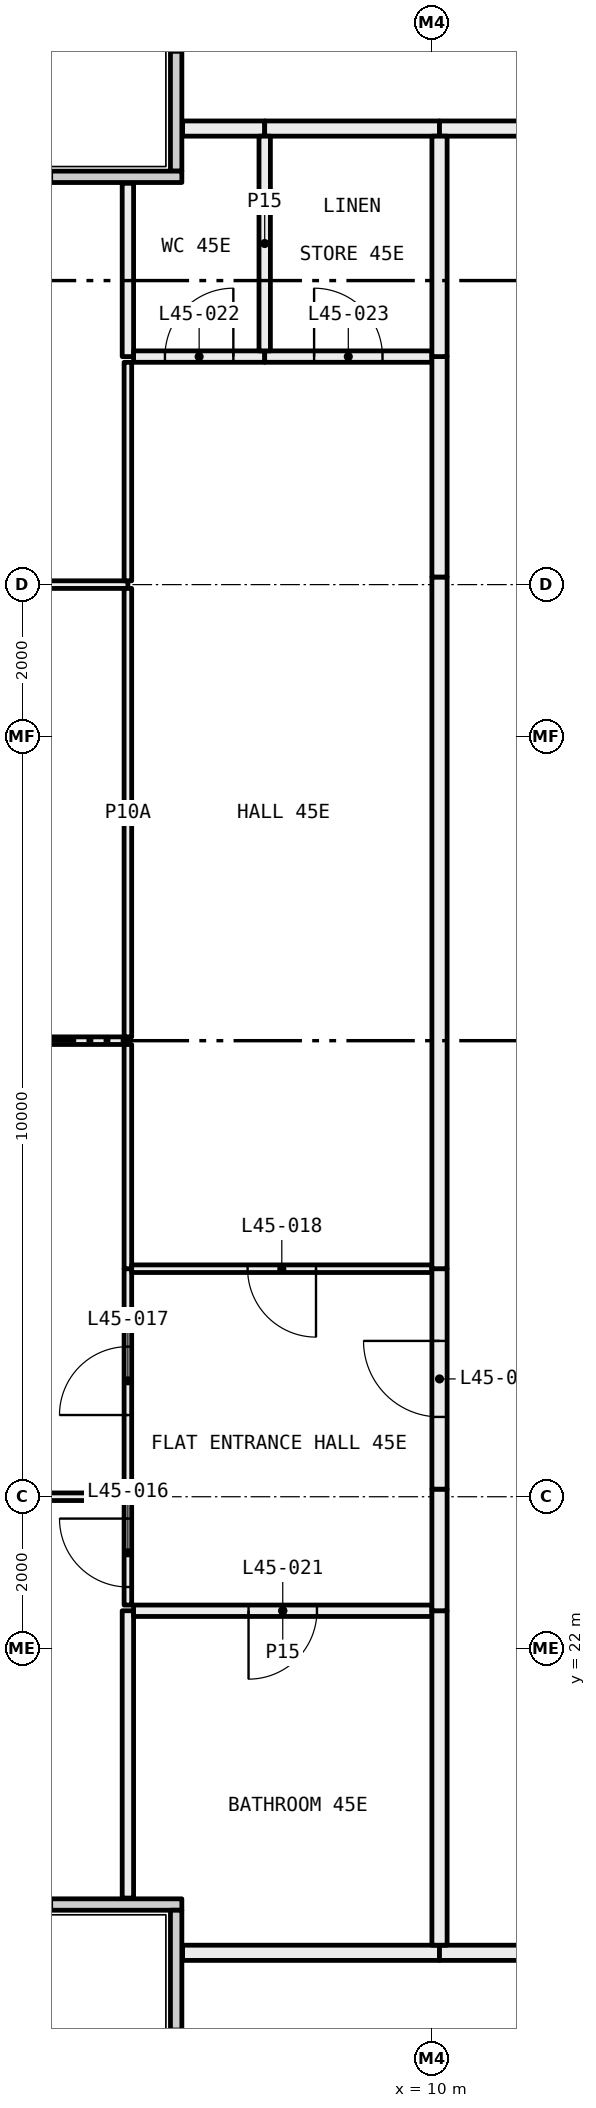
"""IFC4 building model, lengths in metres.
Left out: names, types, materials, properties, quantities, classifications, styles, units other than length and angle.
Written with IfcOpenShell. Run it as: python <this file> out.ifc"""

import sys

from ifc_helpers import new_model, si_unit, direction, frame, frame_2d, origin, place, context, subcontext, project, spatial, rectangle, extrude, element, fill, save


model = new_model("IFC4")
c1 = context("Model", 3, precision=1e-05, world=origin(), true_north=direction((0.0, 1.0)))
c2 = subcontext(c1, "Body", "Model", "MODEL_VIEW")
j1 = project(units=[si_unit("LENGTHUNIT", "METRE"), si_unit("PLANEANGLEUNIT", "RADIAN")], contexts=[c1])
p1 = place(None, origin())
s1 = spatial("IfcSite", under=j1, at=p1, CompositionType="ELEMENT")
p2 = place(p1, origin())
s2 = spatial("IfcBuilding", under=s1, at=p2, CompositionType="ELEMENT")
p3 = place(p2, frame((0.0, 0.0, 172.05)))
s3 = spatial("IfcBuildingStorey", under=s2, at=p3, CompositionType="ELEMENT", Elevation=172.05)
p4 = place(p3, frame((6.635, 41.44, 0.0), z_axis=(0.0, 0.0, 1.0), x_axis=(0.0, 1.0, 0.0)))
e1 = element("IfcWall", 1, at=p4, inside=s3, PredefinedType="ELEMENTEDWALL", context=c2, shape_type="SweptSolid", body=[
    extrude(rectangle(XDim=5.85, YDim=0.15, at=frame_2d((2.925, 0.0))), origin(), (0.0, 0.0, 1.0), 3.05),
])
p5 = place(p4, frame((1.56, 0.0, 0.45)))
e2 = element("IfcOpeningElement", 2, at=p5, cuts=e1, PredefinedType="OPENING", context=c2, shape_type="SweptSolid", body=[
    extrude(rectangle(XDim=4.0, YDim=2.55, at=frame_2d((2.0, 1.275))), frame((0.0, 0.085, 0.0), z_axis=(0.0, -1.0, 0.0), x_axis=(1.0, 0.0, 0.0)), (0.0, 0.0, 1.0), 0.17),
])
p6 = place(p3, frame((0.56, 41.365, 0.0), z_axis=(0.0, 0.0, 1.0), x_axis=(1.0, 0.0, 0.0)))
e3 = element("IfcWall", 3, at=p6, inside=s3, PredefinedType="ELEMENTEDWALL", context=c2, shape_type="SweptSolid", body=[
    extrude(rectangle(XDim=6.15, YDim=0.15, at=frame_2d((3.075, 0.0))), origin(), (0.0, 0.0, 1.0), 3.05),
])
p7 = place(p6, frame((0.44, 0.0, 0.45)))
e4 = element("IfcOpeningElement", 4, at=p7, cuts=e3, PredefinedType="OPENING", context=c2, shape_type="SweptSolid", body=[
    extrude(rectangle(XDim=4.0, YDim=2.55, at=frame_2d((2.0, 1.275))), frame((0.0, 0.085, 0.0), z_axis=(0.0, -1.0, 0.0), x_axis=(1.0, 0.0, 0.0)), (0.0, 0.0, 1.0), 0.17),
])
p8 = place(p3, frame((0.56, 18.635, 0.0), z_axis=(0.0, 0.0, 1.0), x_axis=(1.0, 0.0, 0.0)))
e5 = element("IfcWall", 5, at=p8, inside=s3, PredefinedType="ELEMENTEDWALL", context=c2, shape_type="SweptSolid", body=[
    extrude(rectangle(XDim=6.15, YDim=0.15, at=frame_2d((3.075, 0.0))), origin(), (0.0, 0.0, 1.0), 3.05),
])
p9 = place(p8, frame((0.44, 0.0, 0.45)))
e6 = element("IfcOpeningElement", 6, at=p9, cuts=e5, PredefinedType="OPENING", context=c2, shape_type="SweptSolid", body=[
    extrude(rectangle(XDim=4.0, YDim=2.55, at=frame_2d((2.0, 1.275))), frame((0.0, 0.085, 0.0), z_axis=(0.0, -1.0, 0.0), x_axis=(1.0, 0.0, 0.0)), (0.0, 0.0, 1.0), 0.17),
])
p10 = place(p3, frame((6.635, 12.71, 0.0), z_axis=(0.0, 0.0, 1.0), x_axis=(0.0, 1.0, 0.0)))
e7 = element("IfcWall", 7, at=p10, inside=s3, PredefinedType="ELEMENTEDWALL", context=c2, shape_type="SweptSolid", body=[
    extrude(rectangle(XDim=5.85, YDim=0.15, at=frame_2d((2.925, 0.0))), origin(), (0.0, 0.0, 1.0), 3.05),
])
p11 = place(p10, frame((0.29, 0.0, 0.45)))
e8 = element("IfcOpeningElement", 8, at=p11, cuts=e7, PredefinedType="OPENING", context=c2, shape_type="SweptSolid", body=[
    extrude(rectangle(XDim=4.0, YDim=2.55, at=frame_2d((2.0, 1.275))), frame((0.0, 0.085, 0.0), z_axis=(0.0, -1.0, 0.0), x_axis=(1.0, 0.0, 0.0)), (0.0, 0.0, 1.0), 0.17),
])
p12 = place(p3, frame((10.1, 18.0, 0.0), z_axis=(0.0, 0.0, 1.0), x_axis=(-1.0, 0.0, 0.0)))
e9 = element("IfcWall", 9, at=p12, inside=s3, PredefinedType="PARTITIONING", context=c2, shape_type="SweptSolid", body=[
    extrude(rectangle(XDim=3.38, YDim=0.2, at=frame_2d((1.69, 0.0))), origin(), (0.0, 0.0, 1.0), 3.05),
])
p13 = place(p3, frame((12.0, 18.0, 0.0), z_axis=(0.0, 0.0, 1.0), x_axis=(-1.0, 0.0, 0.0)))
e10 = element("IfcWall", 10, at=p13, inside=s3, PredefinedType="PARTITIONING", context=c2, shape_type="SweptSolid", body=[
    extrude(rectangle(XDim=1.9, YDim=0.2, at=frame_2d((0.95, 0.0))), origin(), (0.0, 0.0, 1.0), 3.05),
])
p14 = place(p3, frame((6.72, 42.0, 0.0), z_axis=(0.0, 0.0, 1.0), x_axis=(1.0, 0.0, 0.0)))
e11 = element("IfcWall", 11, at=p14, inside=s3, PredefinedType="PARTITIONING", context=c2, shape_type="SweptSolid", body=[
    extrude(rectangle(XDim=1.08, YDim=0.2, at=frame_2d((0.54, 0.0))), origin(), (0.0, 0.0, 1.0), 3.05),
])
p15 = place(p3, frame((7.8, 42.0, 0.0), z_axis=(0.0, 0.0, 1.0), x_axis=(1.0, 0.0, 0.0)))
e12 = element("IfcWall", 12, at=p15, inside=s3, PredefinedType="PARTITIONING", context=c2, shape_type="SweptSolid", body=[
    extrude(rectangle(XDim=2.3, YDim=0.2, at=frame_2d((1.15, 0.0))), origin(), (0.0, 0.0, 1.0), 3.05),
])
p16 = place(p3, frame((10.1, 42.0, 0.0), z_axis=(0.0, 0.0, 1.0), x_axis=(1.0, 0.0, 0.0)))
e13 = element("IfcWall", 13, at=p16, inside=s3, PredefinedType="PARTITIONING", context=c2, shape_type="SweptSolid", body=[
    extrude(rectangle(XDim=1.9, YDim=0.2, at=frame_2d((0.95, 0.0))), origin(), (0.0, 0.0, 1.0), 3.05),
])
p17 = place(p3, frame((6.0, 24.0, 0.0), z_axis=(0.0, 0.0, 1.0), x_axis=(-1.0, 0.0, 0.0)))
e14 = element("IfcWall", 14, at=p17, inside=s3, PredefinedType="PARTITIONING", context=c2, shape_type="SweptSolid", body=[
    extrude(rectangle(XDim=5.28, YDim=0.1, at=frame_2d((2.64, 0.0))), origin(), (0.0, 0.0, 1.0), 2.45),
])
p18 = place(p3, frame((6.0, 18.72, 0.0), z_axis=(0.0, 0.0, 1.0), x_axis=(0.0, 1.0, 0.0)))
e15 = element("IfcWall", 15, at=p18, inside=s3, PredefinedType="PARTITIONING", context=c2, shape_type="SweptSolid", body=[
    extrude(rectangle(XDim=3.78, YDim=0.15, at=frame_2d((1.89, 0.0))), origin(), (0.0, 0.0, 1.0), 3.05),
])
p19 = place(p3, frame((6.0, 22.575, 0.0), z_axis=(0.0, 0.0, 1.0), x_axis=(0.0, 1.0, 0.0)))
e16 = element("IfcWall", 16, at=p19, inside=s3, PredefinedType="PARTITIONING", context=c2, shape_type="SweptSolid", body=[
    extrude(rectangle(XDim=1.375, YDim=0.1, at=frame_2d((0.688, 0.0))), origin(), (0.0, 0.0, 1.0), 2.45),
])
p20 = place(p19, frame((0.238, 0.0, 0.0)))
e17 = element("IfcOpeningElement", 17, at=p20, cuts=e16, PredefinedType="OPENING", context=c2, shape_type="SweptSolid", body=[
    extrude(rectangle(XDim=0.9, YDim=2.1, at=frame_2d((0.45, 1.05))), frame((0.0, 0.06, 0.0), z_axis=(0.0, -1.0, 0.0), x_axis=(1.0, 0.0, 0.0)), (0.0, 0.0, 1.0), 0.12),
])
p21 = place(p3, frame((6.0, 30.0, 0.0), z_axis=(0.0, 0.0, 1.0), x_axis=(-1.0, 0.0, 0.0)))
e18 = element("IfcWall", 18, at=p21, inside=s3, PredefinedType="PARTITIONING", context=c2, shape_type="SweptSolid", body=[
    extrude(rectangle(XDim=5.28, YDim=0.1, at=frame_2d((2.64, 0.0))), origin(), (0.0, 0.0, 1.0), 3.05),
])
p22 = place(p21, frame((2.19, 0.0, 0.0)))
e19 = element("IfcOpeningElement", 19, at=p22, cuts=e18, PredefinedType="OPENING", context=c2, shape_type="SweptSolid", body=[
    extrude(rectangle(XDim=0.9, YDim=2.1, at=frame_2d((0.45, 1.05))), frame((0.0, 0.06, 0.0), z_axis=(0.0, -1.0, 0.0), x_axis=(1.0, 0.0, 0.0)), (0.0, 0.0, 1.0), 0.12),
])
p23 = place(p3, frame((6.0, 24.05, 0.0), z_axis=(0.0, 0.0, 1.0), x_axis=(0.0, 1.0, 0.0)))
e20 = element("IfcWall", 20, at=p23, inside=s3, PredefinedType="PARTITIONING", context=c2, shape_type="SweptSolid", body=[
    extrude(rectangle(XDim=2.95, YDim=0.1, at=frame_2d((1.475, 0.0))), origin(), (0.0, 0.0, 1.0), 2.45),
])
p24 = place(p23, frame((1.025, 0.0, 0.0)))
e21 = element("IfcOpeningElement", 21, at=p24, cuts=e20, PredefinedType="OPENING", context=c2, shape_type="SweptSolid", body=[
    extrude(rectangle(XDim=0.9, YDim=2.1, at=frame_2d((0.45, 1.05))), frame((0.0, 0.06, 0.0), z_axis=(0.0, -1.0, 0.0), x_axis=(1.0, 0.0, 0.0)), (0.0, 0.0, 1.0), 0.12),
])
p25 = place(p3, frame((6.0, 27.0, 0.0), z_axis=(0.0, 0.0, 1.0), x_axis=(0.0, 1.0, 0.0)))
e22 = element("IfcWall", 22, at=p25, inside=s3, PredefinedType="PARTITIONING", context=c2, shape_type="SweptSolid", body=[
    extrude(rectangle(XDim=2.95, YDim=0.1, at=frame_2d((1.475, 0.0))), origin(), (0.0, 0.0, 1.0), 3.05),
])
p26 = place(p3, frame((6.0, 36.0, 0.0), z_axis=(0.0, 0.0, 1.0), x_axis=(-1.0, 0.0, 0.0)))
e23 = element("IfcWall", 23, at=p26, inside=s3, PredefinedType="PARTITIONING", context=c2, shape_type="SweptSolid", body=[
    extrude(rectangle(XDim=5.28, YDim=0.1, at=frame_2d((2.64, 0.0))), origin(), (0.0, 0.0, 1.0), 2.45),
])
p27 = place(p26, frame((2.19, 0.0, 0.0)))
e24 = element("IfcOpeningElement", 24, at=p27, cuts=e23, PredefinedType="OPENING", context=c2, shape_type="SweptSolid", body=[
    extrude(rectangle(XDim=0.9, YDim=2.1, at=frame_2d((0.45, 1.05))), frame((0.0, 0.06, 0.0), z_axis=(0.0, -1.0, 0.0), x_axis=(1.0, 0.0, 0.0)), (0.0, 0.0, 1.0), 0.12),
])
p28 = place(p3, frame((6.0, 30.05, 0.0), z_axis=(0.0, 0.0, 1.0), x_axis=(0.0, 1.0, 0.0)))
e25 = element("IfcWall", 25, at=p28, inside=s3, PredefinedType="PARTITIONING", context=c2, shape_type="SweptSolid", body=[
    extrude(rectangle(XDim=5.9, YDim=0.1, at=frame_2d((2.95, 0.0))), origin(), (0.0, 0.0, 1.0), 2.45),
])
p29 = place(p3, frame((6.0, 36.05, 0.0), z_axis=(0.0, 0.0, 1.0), x_axis=(0.0, 1.0, 0.0)))
e26 = element("IfcWall", 26, at=p29, inside=s3, PredefinedType="PARTITIONING", context=c2, shape_type="SweptSolid", body=[
    extrude(rectangle(XDim=2.875, YDim=0.1, at=frame_2d((1.438, 0.0))), origin(), (0.0, 0.0, 1.0), 2.45),
])
p30 = place(p3, frame((6.0, 39.0, 0.0), z_axis=(0.0, 0.0, 1.0), x_axis=(0.0, 1.0, 0.0)))
e27 = element("IfcWall", 27, at=p30, inside=s3, PredefinedType="PARTITIONING", context=c2, shape_type="SweptSolid", body=[
    extrude(rectangle(XDim=2.28, YDim=0.15, at=frame_2d((1.14, 0.0))), origin(), (0.0, 0.0, 1.0), 3.05),
])
p31 = place(p3, frame((10.0, 22.5, 0.0), z_axis=(0.0, 0.0, 1.0), x_axis=(-1.0, 0.0, 0.0)))
e28 = element("IfcWall", 28, at=p31, inside=s3, PredefinedType="PARTITIONING", context=c2, shape_type="SweptSolid", body=[
    extrude(rectangle(XDim=3.925, YDim=0.15, at=frame_2d((1.962, 0.0))), origin(), (0.0, 0.0, 1.0), 3.05),
])
p32 = place(p31, frame((1.512, 0.0, 0.0)))
e29 = element("IfcOpeningElement", 29, at=p32, cuts=e28, PredefinedType="OPENING", context=c2, shape_type="SweptSolid", body=[
    extrude(rectangle(XDim=0.9, YDim=2.1, at=frame_2d((0.45, 1.05))), frame((0.0, 0.085, 0.0), z_axis=(0.0, -1.0, 0.0), x_axis=(1.0, 0.0, 0.0)), (0.0, 0.0, 1.0), 0.17),
])
p33 = place(p3, frame((10.1, 18.1, 0.0), z_axis=(0.0, 0.0, 1.0), x_axis=(0.0, 1.0, 0.0)))
e30 = element("IfcWall", 30, at=p33, inside=s3, PredefinedType="PARTITIONING", context=c2, shape_type="SweptSolid", body=[
    extrude(rectangle(XDim=4.4, YDim=0.2, at=frame_2d((2.2, 0.0))), origin(), (0.0, 0.0, 1.0), 3.05),
])
p34 = place(p3, frame((10.0, 27.0, 0.0), z_axis=(0.0, 0.0, 1.0), x_axis=(-1.0, 0.0, 0.0)))
e31 = element("IfcWall", 31, at=p34, inside=s3, PredefinedType="PARTITIONING", context=c2, shape_type="SweptSolid", body=[
    extrude(rectangle(XDim=3.95, YDim=0.1, at=frame_2d((1.975, 0.0))), origin(), (0.0, 0.0, 1.0), 3.05),
])
p35 = place(p34, frame((1.525, 0.0, 0.0)))
e32 = element("IfcOpeningElement", 32, at=p35, cuts=e31, PredefinedType="OPENING", context=c2, shape_type="SweptSolid", body=[
    extrude(rectangle(XDim=0.9, YDim=2.1, at=frame_2d((0.45, 1.05))), frame((0.0, 0.06, 0.0), z_axis=(0.0, -1.0, 0.0), x_axis=(1.0, 0.0, 0.0)), (0.0, 0.0, 1.0), 0.12),
])
p36 = place(p3, frame((10.1, 22.5, 0.0), z_axis=(0.0, 0.0, 1.0), x_axis=(0.0, 1.0, 0.0)))
e33 = element("IfcWall", 33, at=p36, inside=s3, PredefinedType="PARTITIONING", context=c2, shape_type="SweptSolid", body=[
    extrude(rectangle(XDim=1.6, YDim=0.2, at=frame_2d((0.8, 0.0))), origin(), (0.0, 0.0, 1.0), 2.45),
])
p37 = place(p3, frame((10.1, 24.1, 0.0), z_axis=(0.0, 0.0, 1.0), x_axis=(0.0, 1.0, 0.0)))
e34 = element("IfcWall", 34, at=p37, inside=s3, PredefinedType="PARTITIONING", context=c2, shape_type="SweptSolid", body=[
    extrude(rectangle(XDim=2.9, YDim=0.2, at=frame_2d((1.45, 0.0))), origin(), (0.0, 0.0, 1.0), 3.05),
])
p38 = place(p37, frame((0.95, 0.0, 0.0)))
e35 = element("IfcOpeningElement", 35, at=p38, cuts=e34, PredefinedType="OPENING", context=c2, shape_type="SweptSolid", body=[
    extrude(rectangle(XDim=1.0, YDim=2.1, at=frame_2d((0.5, 1.05))), frame((0.0, 0.11, 0.0), z_axis=(0.0, -1.0, 0.0), x_axis=(1.0, 0.0, 0.0)), (0.0, 0.0, 1.0), 0.22),
])
p39 = place(p3, frame((7.8, 39.0, 0.0), z_axis=(0.0, 0.0, 1.0), x_axis=(-1.0, 0.0, 0.0)))
e36 = element("IfcWall", 36, at=p39, inside=s3, PredefinedType="PARTITIONING", context=c2, shape_type="SweptSolid", body=[
    extrude(rectangle(XDim=1.725, YDim=0.15, at=frame_2d((0.863, 0.0))), origin(), (0.0, 0.0, 1.0), 3.05),
])
p40 = place(p39, frame((0.413, 0.0, 0.0)))
e37 = element("IfcOpeningElement", 37, at=p40, cuts=e36, PredefinedType="OPENING", context=c2, shape_type="SweptSolid", body=[
    extrude(rectangle(XDim=0.9, YDim=2.1, at=frame_2d((0.45, 1.05))), frame((0.0, 0.085, 0.0), z_axis=(0.0, -1.0, 0.0), x_axis=(1.0, 0.0, 0.0)), (0.0, 0.0, 1.0), 0.17),
])
p41 = place(p3, frame((10.0, 39.0, 0.0), z_axis=(0.0, 0.0, 1.0), x_axis=(-1.0, 0.0, 0.0)))
e38 = element("IfcWall", 38, at=p41, inside=s3, PredefinedType="PARTITIONING", context=c2, shape_type="SweptSolid", body=[
    extrude(rectangle(XDim=2.2, YDim=0.15, at=frame_2d((1.1, 0.0))), origin(), (0.0, 0.0, 1.0), 3.05),
])
p42 = place(p41, frame((0.65, 0.0, 0.0)))
e39 = element("IfcOpeningElement", 39, at=p42, cuts=e38, PredefinedType="OPENING", context=c2, shape_type="SweptSolid", body=[
    extrude(rectangle(XDim=0.9, YDim=2.1, at=frame_2d((0.45, 1.05))), frame((0.0, 0.085, 0.0), z_axis=(0.0, -1.0, 0.0), x_axis=(1.0, 0.0, 0.0)), (0.0, 0.0, 1.0), 0.17),
])
p43 = place(p3, frame((10.1, 27.0, 0.0), z_axis=(0.0, 0.0, 1.0), x_axis=(0.0, 1.0, 0.0)))
e40 = element("IfcWall", 40, at=p43, inside=s3, PredefinedType="PARTITIONING", context=c2, shape_type="SweptSolid", body=[
    extrude(rectangle(XDim=9.1, YDim=0.2, at=frame_2d((4.55, 0.0))), origin(), (0.0, 0.0, 1.0), 2.45),
])
p44 = place(p3, frame((10.1, 36.1, 0.0), z_axis=(0.0, 0.0, 1.0), x_axis=(0.0, 1.0, 0.0)))
e41 = element("IfcWall", 41, at=p44, inside=s3, PredefinedType="PARTITIONING", context=c2, shape_type="SweptSolid", body=[
    extrude(rectangle(XDim=2.9, YDim=0.2, at=frame_2d((1.45, 0.0))), origin(), (0.0, 0.0, 1.0), 3.05),
])
p45 = place(p3, frame((7.8, 39.075, 0.0), z_axis=(0.0, 0.0, 1.0), x_axis=(0.0, 1.0, 0.0)))
e42 = element("IfcWall", 42, at=p45, inside=s3, PredefinedType="PARTITIONING", context=c2, shape_type="SweptSolid", body=[
    extrude(rectangle(XDim=2.825, YDim=0.15, at=frame_2d((1.413, 0.0))), origin(), (0.0, 0.0, 1.0), 3.05),
])
p46 = place(p3, frame((10.1, 39.0, 0.0), z_axis=(0.0, 0.0, 1.0), x_axis=(0.0, 1.0, 0.0)))
e43 = element("IfcWall", 43, at=p46, inside=s3, PredefinedType="PARTITIONING", context=c2, shape_type="SweptSolid", body=[
    extrude(rectangle(XDim=2.9, YDim=0.2, at=frame_2d((1.45, 0.0))), origin(), (0.0, 0.0, 1.0), 3.05),
])
p47 = place(p38, origin())
e44 = element("IfcDoor", 44, at=p47, inside=s3, OperationType="SINGLE_SWING_LEFT", PredefinedType="DOOR", context=c2, shape_type="SweptSolid", body=[
    extrude(rectangle(XDim=1.0, YDim=2.1, at=frame_2d((0.5, 1.05))), frame((0.0, 0.025, 0.0), z_axis=(0.0, -1.0, 0.0), x_axis=(1.0, 0.0, 0.0)), (0.0, 0.0, 1.0), 0.05),
])
fill(e35, e44)
p48 = place(p20, origin())
e45 = element("IfcDoor", 45, at=p48, inside=s3, OperationType="SINGLE_SWING_LEFT", PredefinedType="DOOR", context=c2, shape_type="SweptSolid", body=[
    extrude(rectangle(XDim=0.9, YDim=2.1, at=frame_2d((0.45, 1.05))), frame((0.0, 0.025, 0.0), z_axis=(0.0, -1.0, 0.0), x_axis=(1.0, 0.0, 0.0)), (0.0, 0.0, 1.0), 0.05),
])
fill(e17, e45)
p49 = place(p24, origin())
e46 = element("IfcDoor", 46, at=p49, inside=s3, OperationType="SINGLE_SWING_RIGHT", PredefinedType="DOOR", context=c2, shape_type="SweptSolid", body=[
    extrude(rectangle(XDim=0.9, YDim=2.1, at=frame_2d((0.45, 1.05))), frame((0.0, 0.025, 0.0), z_axis=(0.0, -1.0, 0.0), x_axis=(1.0, 0.0, 0.0)), (0.0, 0.0, 1.0), 0.05),
])
fill(e21, e46)
p50 = place(p35, origin())
e47 = element("IfcDoor", 47, at=p50, inside=s3, OperationType="SINGLE_SWING_RIGHT", PredefinedType="DOOR", context=c2, shape_type="SweptSolid", body=[
    extrude(rectangle(XDim=0.9, YDim=2.1, at=frame_2d((0.45, 1.05))), frame((0.0, 0.025, 0.0), z_axis=(0.0, -1.0, 0.0), x_axis=(1.0, 0.0, 0.0)), (0.0, 0.0, 1.0), 0.05),
])
fill(e32, e47)
p51 = place(p32, origin())
e48 = element("IfcDoor", 48, at=p51, inside=s3, OperationType="SINGLE_SWING_LEFT", PredefinedType="DOOR", context=c2, shape_type="SweptSolid", body=[
    extrude(rectangle(XDim=0.9, YDim=2.1, at=frame_2d((0.45, 1.05))), frame((0.0, 0.025, 0.0), z_axis=(0.0, -1.0, 0.0), x_axis=(1.0, 0.0, 0.0)), (0.0, 0.0, 1.0), 0.05),
])
fill(e29, e48)
p52 = place(p40, frame((0.9, 0.0, 0.0), x_axis=(-1.0, 0.0, 0.0)))
e49 = element("IfcDoor", 49, at=p52, inside=s3, OperationType="SINGLE_SWING_LEFT", PredefinedType="DOOR", context=c2, shape_type="SweptSolid", body=[
    extrude(rectangle(XDim=0.9, YDim=2.1, at=frame_2d((0.45, 1.05))), frame((0.0, 0.025, 0.0), z_axis=(0.0, -1.0, 0.0), x_axis=(1.0, 0.0, 0.0)), (0.0, 0.0, 1.0), 0.05),
])
fill(e37, e49)
p53 = place(p42, frame((0.9, 0.0, 0.0), x_axis=(-1.0, 0.0, 0.0)))
e50 = element("IfcDoor", 50, at=p53, inside=s3, OperationType="SINGLE_SWING_RIGHT", PredefinedType="DOOR", context=c2, shape_type="SweptSolid", body=[
    extrude(rectangle(XDim=0.9, YDim=2.1, at=frame_2d((0.45, 1.05))), frame((0.0, 0.025, 0.0), z_axis=(0.0, -1.0, 0.0), x_axis=(1.0, 0.0, 0.0)), (0.0, 0.0, 1.0), 0.05),
])
fill(e39, e50)
save(model, sys.argv[1])
